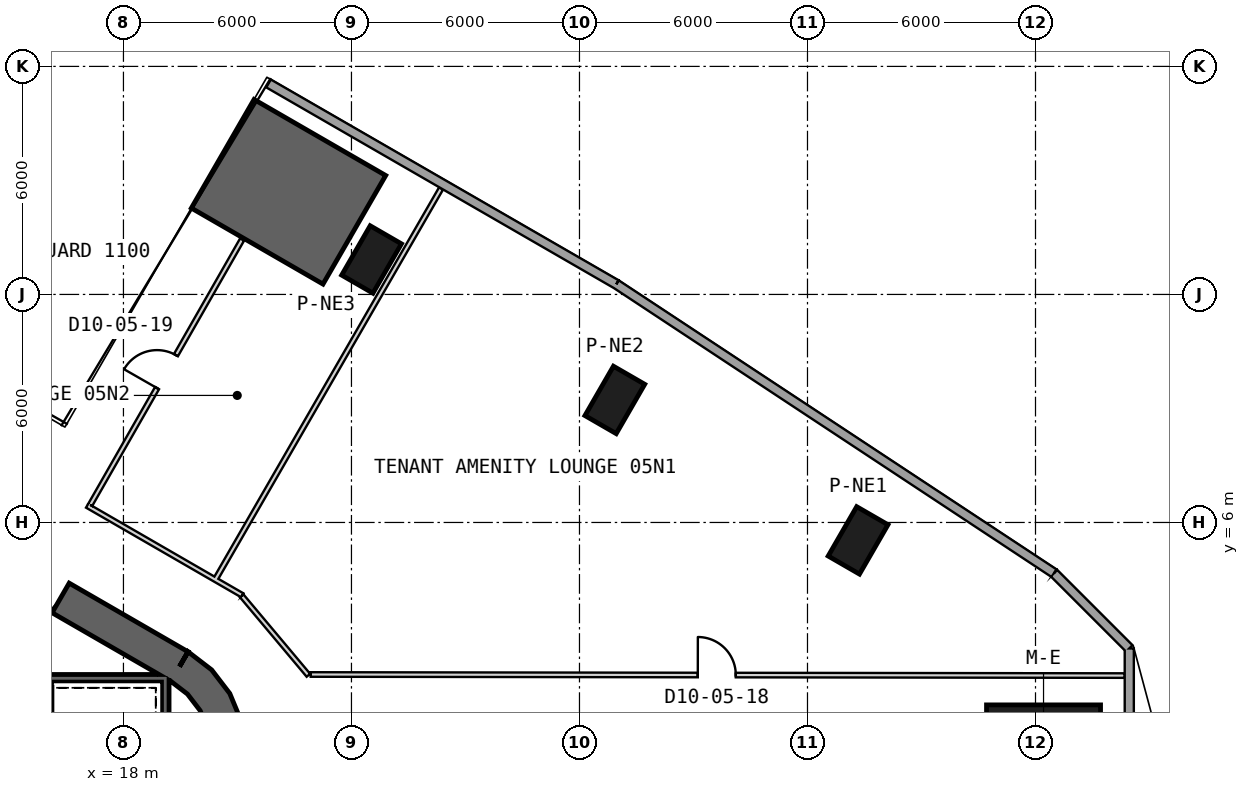
"""IFC4 building model, lengths in metres.
Left out: names, types, materials, properties, quantities, classifications, styles, units other than length and angle.
Written with IfcOpenShell. Run it as: python <this file> out.ifc"""

import sys

from ifc_helpers import new_model, si_unit, direction, frame, frame_2d, origin, origin_2d, place, context, subcontext, project, spatial, polyline, rectangle, outline, extrude, element, fill, save


model = new_model("IFC4")
c1 = context("Model", 3, precision=1e-05, world=origin(), true_north=direction((0.0, 1.0)))
c2 = subcontext(c1, "Body", "Model", "MODEL_VIEW")
j1 = project(units=[si_unit("LENGTHUNIT", "METRE"), si_unit("PLANEANGLEUNIT", "RADIAN")], contexts=[c1])
p1 = place(None, origin())
s1 = spatial("IfcSite", under=j1, at=p1, CompositionType="ELEMENT")
p2 = place(p1, origin())
s2 = spatial("IfcBuilding", under=s1, at=p2, CompositionType="ELEMENT")
p3 = place(p2, frame((0.0, 0.0, 33.5)))
s3 = spatial("IfcBuildingStorey", under=s2, at=p3, CompositionType="ELEMENT", Elevation=33.5)
p4 = place(p3, frame((42.211, 0.0, 0.0), z_axis=(0.0, 0.0, 1.0), x_axis=(1.0, 0.0, 0.0)))
e1 = element("IfcColumn", 1, at=p4, inside=s3, PredefinedType="COLUMN", context=c2, shape_type="SweptSolid", body=[
    extrude(rectangle(XDim=3.0, YDim=2.4, at=origin_2d()), origin(), (0.0, 0.0, 1.0), 6.0),
])
for number, where, z_axis, x_axis in (
    (2, (37.331, 5.528, 0.0), (0.0, 0.0, 1.0), (0.5, 0.866, 0.0)),
    (3, (30.93, 9.224, 0.0), (0.0, 0.0, 1.0), (0.5, 0.866, 0.0)),
    (4, (24.529, 12.92, 0.0), (0.0, 0.0, 1.0), (0.5, 0.866, 0.0)),
):
    element("IfcColumn", number, at=place(p3, frame(where, z_axis=z_axis, x_axis=x_axis)), inside=s3, PredefinedType="COLUMN", context=c2, shape_type="SweptSolid", body=[
        extrude(rectangle(XDim=1.5, YDim=0.95, at=origin_2d()), origin(), (0.0, 0.0, 1.0), 6.0),
    ])
p5 = place(p3, frame((19.475, 2.208, 0.0), z_axis=(0.0, 0.0, 1.0), x_axis=(-0.866028369851, 0.499994862586, 0.0)))
e5 = element("IfcWall", 5, at=p5, inside=s3, PredefinedType="SHEAR", context=c2, shape_type="SweptSolid", body=[
    extrude(rectangle(XDim=31.523, YDim=0.9, at=frame_2d((15.762, 0.0))), origin(), (0.0, 0.0, 1.0), 6.0),
])
p6 = place(p5, frame((7.062, 0.0, 0.0)))
e6 = element("IfcOpeningElement", 6, at=p6, cuts=e5, PredefinedType="OPENING", context=c2, shape_type="SweptSolid", body=[
    extrude(rectangle(XDim=1.2, YDim=2.4, at=frame_2d((0.6, 1.2))), frame((0.0, 0.46, 0.0), z_axis=(0.0, -1.0, 0.0), x_axis=(1.0, 0.0, 0.0)), (0.0, 0.0, 1.0), 0.92),
])
p7 = place(p5, frame((9.762, 0.0, 0.0)))
e7 = element("IfcOpeningElement", 7, at=p7, cuts=e5, PredefinedType="OPENING", context=c2, shape_type="SweptSolid", body=[
    extrude(rectangle(XDim=1.2, YDim=2.4, at=frame_2d((0.6, 1.2))), frame((0.0, 0.46, 0.0), z_axis=(0.0, -1.0, 0.0), x_axis=(1.0, 0.0, 0.0)), (0.0, 0.0, 1.0), 0.92),
])
p8 = place(p5, frame((12.462, 0.0, 0.0)))
e8 = element("IfcOpeningElement", 8, at=p8, cuts=e5, PredefinedType="OPENING", context=c2, shape_type="SweptSolid", body=[
    extrude(rectangle(XDim=1.2, YDim=2.4, at=frame_2d((0.6, 1.2))), frame((0.0, 0.46, 0.0), z_axis=(0.0, -1.0, 0.0), x_axis=(1.0, 0.0, 0.0)), (0.0, 0.0, 1.0), 0.92),
])
p9 = place(p5, frame((15.162, 0.0, 0.0)))
e9 = element("IfcOpeningElement", 9, at=p9, cuts=e5, PredefinedType="OPENING", context=c2, shape_type="SweptSolid", body=[
    extrude(rectangle(XDim=1.2, YDim=2.4, at=frame_2d((0.6, 1.2))), frame((0.0, 0.46, 0.0), z_axis=(0.0, -1.0, 0.0), x_axis=(1.0, 0.0, 0.0)), (0.0, 0.0, 1.0), 0.92),
])
p10 = place(p5, frame((17.862, 0.0, 0.0)))
e10 = element("IfcOpeningElement", 10, at=p10, cuts=e5, PredefinedType="OPENING", context=c2, shape_type="SweptSolid", body=[
    extrude(rectangle(XDim=1.2, YDim=2.4, at=frame_2d((0.6, 1.2))), frame((0.0, 0.46, 0.0), z_axis=(0.0, -1.0, 0.0), x_axis=(1.0, 0.0, 0.0)), (0.0, 0.0, 1.0), 0.92),
])
p11 = place(p5, frame((20.562, 0.0, 0.0)))
e11 = element("IfcOpeningElement", 11, at=p11, cuts=e5, PredefinedType="OPENING", context=c2, shape_type="SweptSolid", body=[
    extrude(rectangle(XDim=1.2, YDim=2.4, at=frame_2d((0.6, 1.2))), frame((0.0, 0.46, 0.0), z_axis=(0.0, -1.0, 0.0), x_axis=(1.0, 0.0, 0.0)), (0.0, 0.0, 1.0), 0.92),
])
p12 = place(p5, frame((23.262, 0.0, 0.0)))
e12 = element("IfcOpeningElement", 12, at=p12, cuts=e5, PredefinedType="OPENING", context=c2, shape_type="SweptSolid", body=[
    extrude(rectangle(XDim=1.2, YDim=2.4, at=frame_2d((0.6, 1.2))), frame((0.0, 0.46, 0.0), z_axis=(0.0, -1.0, 0.0), x_axis=(1.0, 0.0, 0.0)), (0.0, 0.0, 1.0), 0.92),
])
p13 = place(p5, frame((3.612, 0.0, 0.0)))
e13 = element("IfcOpeningElement", 13, at=p13, cuts=e5, PredefinedType="OPENING", context=c2, shape_type="SweptSolid", body=[
    extrude(rectangle(XDim=1.2, YDim=2.4, at=frame_2d((0.6, 1.2))), frame((0.0, 0.46, 0.0), z_axis=(0.0, -1.0, 0.0), x_axis=(1.0, 0.0, 0.0)), (0.0, 0.0, 1.0), 0.92),
])
p14 = place(p5, frame((26.712, 0.0, 0.0)))
e14 = element("IfcOpeningElement", 14, at=p14, cuts=e5, PredefinedType="OPENING", context=c2, shape_type="SweptSolid", body=[
    extrude(rectangle(XDim=1.2, YDim=2.4, at=frame_2d((0.6, 1.2))), frame((0.0, 0.46, 0.0), z_axis=(0.0, -1.0, 0.0), x_axis=(1.0, 0.0, 0.0)), (0.0, 0.0, 1.0), 0.92),
])
p15 = place(p3, origin())
e15 = element("IfcWall", 15, at=p15, inside=s3, PredefinedType="SHEAR", context=c2, shape_type="SweptSolid", body=[
    extrude(outline(polyline([(19.7, -2.598), (20.321, -2.121), (20.798, -1.5), (21.098, -0.777), (21.2, 0.0), (21.098, 0.777), (20.798, 1.5), (20.321, 2.121), (19.7, 2.598), (19.25, 1.819), (19.685, 1.485), (20.019, 1.05), (20.229, 0.543), (20.3, 0.0), (20.229, -0.543), (20.019, -1.05), (19.685, -1.485), (19.25, -1.819), (19.7, -2.598)])), origin(), (0.0, 0.0, 1.0), 6.0),
])
p16 = place(p3, origin())
e16 = element("IfcWall", 16, at=p16, inside=s3, PredefinedType="SHEAR", context=c2, shape_type="SweptSolid", body=[
    extrude(outline(polyline([(24.901, 15.13), (21.437, 17.13), (19.787, 14.272), (23.251, 12.272), (24.901, 15.13)])), origin(), (0.0, 0.0, 1.0), 6.0),
])
p17 = place(p3, frame((42.487, 4.666, 0.0), z_axis=(0.0, 0.0, 1.0), x_axis=(-0.834569880428, 0.550902091739, 0.0)))
e17 = element("IfcWall", 17, at=p17, inside=s3, PredefinedType="SOLIDWALL", context=c2, shape_type="SweptSolid", body=[
    extrude(rectangle(XDim=13.802, YDim=0.24, at=frame_2d((6.901, 0.0))), origin(), (0.0, 0.0, 1.0), 5.65),
])
p18 = place(p3, frame((30.969, 12.269, 0.0), z_axis=(0.0, 0.0, 1.0), x_axis=(-0.86605207128, 0.499953807697, 0.0)))
e18 = element("IfcWall", 18, at=p18, inside=s3, PredefinedType="SOLIDWALL", context=c2, shape_type="SweptSolid", body=[
    extrude(rectangle(XDim=10.566, YDim=0.24, at=frame_2d((5.283, 0.0))), origin(), (0.0, 0.0, 1.0), 5.65),
])
p19 = place(p3, frame((44.468, -2.686, 0.0), z_axis=(0.0, 0.0, 1.0), x_axis=(0.0, 1.0, 0.0)))
e19 = element("IfcWall", 19, at=p19, inside=s3, PredefinedType="SOLIDWALL", context=c2, shape_type="SweptSolid", body=[
    extrude(rectangle(XDim=5.371, YDim=0.24, at=frame_2d((2.686, 0.0))), origin(), (0.0, 0.0, 1.0), 5.65),
])
p20 = place(p3, frame((44.468, 2.686, 0.0), z_axis=(0.0, 0.0, 1.0), x_axis=(-0.707106781187, 0.707106781187, 0.0)))
e20 = element("IfcWall", 20, at=p20, inside=s3, PredefinedType="SOLIDWALL", context=c2, shape_type="SweptSolid", body=[
    extrude(rectangle(XDim=2.801, YDim=0.24, at=frame_2d((1.4, 0.0))), origin(), (0.0, 0.0, 1.0), 5.65),
])
p21 = place(p3, frame((19.2, 1.9, -0.3), z_axis=(0.0, 0.0, 1.0), x_axis=(-1.0, 0.0, 0.0)))
e21 = element("IfcWall", 21, at=p21, inside=s3, PredefinedType="SHEAR", context=c2, shape_type="SweptSolid", body=[
    extrude(rectangle(XDim=8.1, YDim=0.2, at=frame_2d((4.05, 0.0))), origin(), (0.0, 0.0, 1.0), 5.95),
])
p22 = place(p3, frame((19.1, 0.11, -0.3), z_axis=(0.0, 0.0, 1.0), x_axis=(0.0, 1.0, 0.0)))
e22 = element("IfcWall", 22, at=p22, inside=s3, PredefinedType="SHEAR", context=c2, shape_type="SweptSolid", body=[
    extrude(rectangle(XDim=1.69, YDim=0.2, at=frame_2d((0.845, 0.0))), origin(), (0.0, 0.0, 1.0), 5.95),
])
p23 = place(p3, frame((21.126, 4.084, 0.0), z_axis=(0.0, 0.0, 1.0), x_axis=(-0.865925898687, 0.500172308292, 0.0)))
e23 = element("IfcWall", 23, at=p23, inside=s3, PredefinedType="PARTITIONING", context=c2, shape_type="SweptSolid", body=[
    extrude(rectangle(XDim=4.713, YDim=0.12, at=frame_2d((2.356, 0.0))), origin(), (0.0, 0.0, 1.0), 4.83),
])
p24 = place(p3, frame((22.867, 1.979, 0.0), z_axis=(0.0, 0.0, 1.0), x_axis=(-0.64290031389, 0.765949858934, 0.0)))
e24 = element("IfcWall", 24, at=p24, inside=s3, PredefinedType="PARTITIONING", context=c2, shape_type="SweptSolid", body=[
    extrude(rectangle(XDim=2.728, YDim=0.12, at=frame_2d((1.364, 0.0))), origin(), (0.0, 0.0, 1.0), 4.73),
])
p25 = place(p3, frame((22.927, 2.0, 0.0), z_axis=(0.0, 0.0, 1.0), x_axis=(0.999999095585, -0.001344927377, 0.0)))
e25 = element("IfcWall", 25, at=p25, inside=s3, PredefinedType="PARTITIONING", context=c2, shape_type="SweptSolid", body=[
    extrude(rectangle(XDim=21.42, YDim=0.12, at=frame_2d((10.71, 0.0))), origin(), (0.0, 0.0, 1.0), 5.65),
])
p26 = place(p25, frame((10.186, 0.0, 0.0)))
e26 = element("IfcOpeningElement", 26, at=p26, cuts=e25, PredefinedType="OPENING", context=c2, shape_type="SweptSolid", body=[
    extrude(rectangle(XDim=1.0, YDim=2.1, at=frame_2d((0.5, 1.05))), frame((0.0, 0.07, 0.0), z_axis=(0.0, -1.0, 0.0), x_axis=(1.0, 0.0, 0.0)), (0.0, 0.0, 1.0), 0.14),
])
p27 = place(p3, frame((17.126, 6.464, 0.0), z_axis=(0.0, 0.0, 1.0), x_axis=(0.496766503813, 0.867884232309, 0.0)))
e27 = element("IfcWall", 27, at=p27, inside=s3, PredefinedType="PARTITIONING", context=c2, shape_type="SweptSolid", body=[
    extrude(rectangle(XDim=8.042, YDim=0.12, at=frame_2d((4.021, 0.0))), origin(), (0.0, 0.0, 1.0), 4.83),
])
p28 = place(p27, frame((3.539, 0.0, 0.0)))
e28 = element("IfcOpeningElement", 28, at=p28, cuts=e27, PredefinedType="OPENING", context=c2, shape_type="SweptSolid", body=[
    extrude(rectangle(XDim=1.0, YDim=2.1, at=frame_2d((0.5, 1.05))), frame((0.0, 0.07, 0.0), z_axis=(0.0, -1.0, 0.0), x_axis=(1.0, 0.0, 0.0)), (0.0, 0.0, 1.0), 0.14),
])
p29 = place(p3, frame((26.357, 14.787, 0.0), z_axis=(0.0, 0.0, 1.0), x_axis=(-0.499945268197, -0.8660570009, 0.0)))
e29 = element("IfcWall", 29, at=p29, inside=s3, PredefinedType="PARTITIONING", context=c2, shape_type="SweptSolid", body=[
    extrude(rectangle(XDim=11.824, YDim=0.12, at=frame_2d((5.912, 0.0))), origin(), (0.0, 0.0, 1.0), 4.83),
])
p30 = place(p26, origin())
e30 = element("IfcDoor", 30, at=p30, inside=s3, OperationType="SINGLE_SWING_LEFT", PredefinedType="NOTDEFINED", context=c2, shape_type="SweptSolid", body=[
    extrude(rectangle(XDim=1.0, YDim=2.1, at=frame_2d((0.5, 1.05))), frame((0.0, 0.025, 0.0), z_axis=(0.0, -1.0, 0.0), x_axis=(1.0, 0.0, 0.0)), (0.0, 0.0, 1.0), 0.05),
])
fill(e26, e30)
p31 = place(p28, origin())
e31 = element("IfcDoor", 31, at=p31, inside=s3, OperationType="SINGLE_SWING_LEFT", PredefinedType="NOTDEFINED", context=c2, shape_type="SweptSolid", body=[
    extrude(rectangle(XDim=1.0, YDim=2.1, at=frame_2d((0.5, 1.05))), frame((0.0, 0.025, 0.0), z_axis=(0.0, -1.0, 0.0), x_axis=(1.0, 0.0, 0.0)), (0.0, 0.0, 1.0), 0.05),
])
fill(e28, e31)
p32 = place(p13, origin())
e32 = element("IfcDoor", 32, at=p32, inside=s3, OperationType="SINGLE_SWING_RIGHT", PredefinedType="USERDEFINED", context=c2, shape_type="SweptSolid", body=[
    extrude(rectangle(XDim=1.2, YDim=2.4, at=frame_2d((0.6, 1.2))), frame((0.0, 0.025, 0.0), z_axis=(0.0, -1.0, 0.0), x_axis=(1.0, 0.0, 0.0)), (0.0, 0.0, 1.0), 0.05),
])
fill(e13, e32)
save(model, sys.argv[1])
